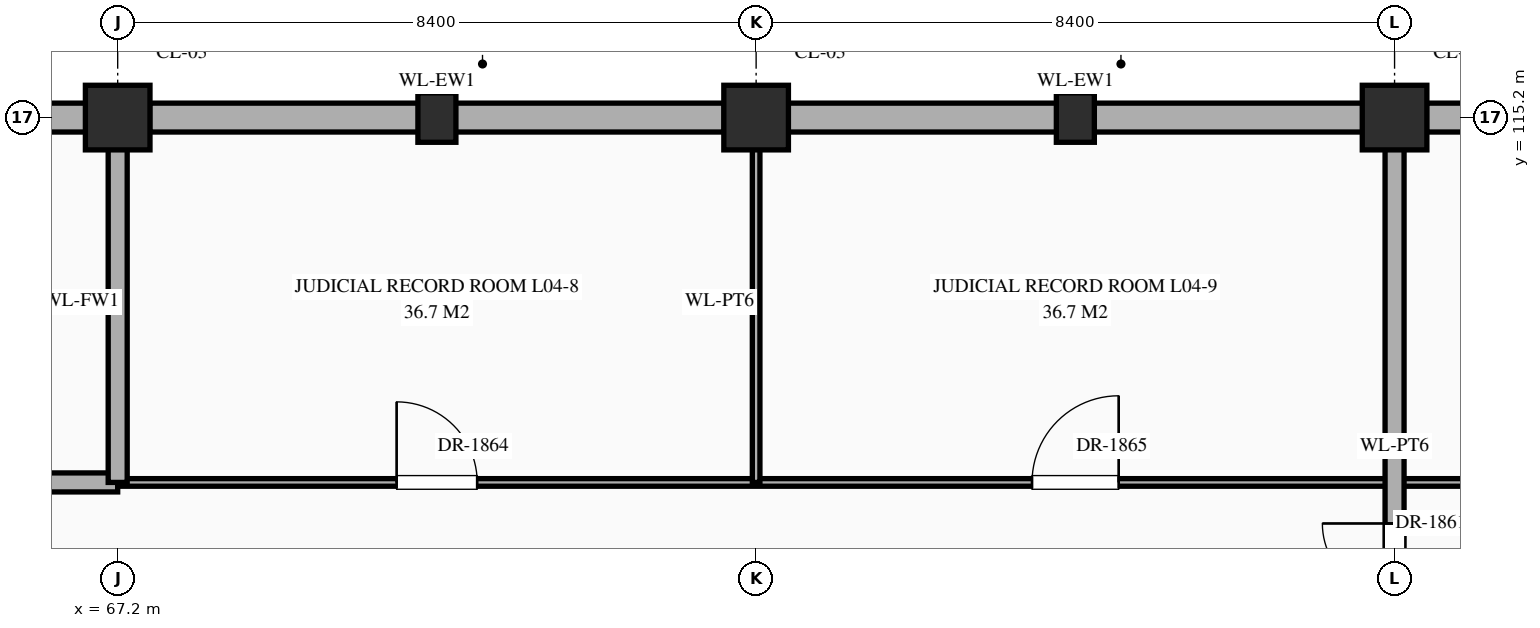
"""IFC4 building model, lengths in metres.
Left out: names, types, materials, properties, quantities, classifications, styles, units other than length and angle.
Written with IfcOpenShell. Run it as: python <this file> out.ifc"""

import sys

from ifc_helpers import new_model, si_unit, direction, frame, frame_2d, origin, origin_2d, place, context, subcontext, project, spatial, rectangle, extrude, element, fill, save


model = new_model("IFC4")
c1 = context("Model", 3, precision=1e-05, world=origin(), true_north=direction((0.0, 1.0)))
c2 = subcontext(c1, "Body", "Model", "MODEL_VIEW")
j1 = project(units=[si_unit("LENGTHUNIT", "METRE"), si_unit("PLANEANGLEUNIT", "RADIAN")], contexts=[c1])
p1 = place(None, origin())
s1 = spatial("IfcSite", under=j1, at=p1, CompositionType="ELEMENT")
p2 = place(p1, origin())
s2 = spatial("IfcBuilding", under=s1, at=p2, CompositionType="ELEMENT")
p3 = place(p2, frame((0.0, 0.0, 16.2)))
s3 = spatial("IfcBuildingStorey", under=s2, at=p3, CompositionType="ELEMENT", Elevation=16.2)
for number, where, z_axis, x_axis in (
    (1, (67.2, 115.2, 0.0), (0.0, 0.0, 1.0), (1.0, 0.0, 0.0)),
    (2, (75.6, 115.2, 0.0), (0.0, 0.0, 1.0), (1.0, 0.0, 0.0)),
    (3, (84.0, 115.2, 0.0), (0.0, 0.0, 1.0), (1.0, 0.0, 0.0)),
):
    element("IfcColumn", number, at=place(p3, frame(where, z_axis=z_axis, x_axis=x_axis)), inside=s3, PredefinedType="COLUMN", context=c2, shape_type="SweptSolid", body=[
        extrude(rectangle(XDim=0.85, YDim=0.85, at=origin_2d()), origin(), (0.0, 0.0, 1.0), 5.4),
    ])
for number, where, z_axis, x_axis in (
    (4, (71.4, 115.2, 0.0), (0.0, 0.0, 1.0), (1.0, 0.0, 0.0)),
    (5, (79.8, 115.2, 0.0), (0.0, 0.0, 1.0), (1.0, 0.0, 0.0)),
):
    element("IfcColumn", number, at=place(p3, frame(where, z_axis=z_axis, x_axis=x_axis)), inside=s3, PredefinedType="PILASTER", context=c2, shape_type="SweptSolid", body=[
        extrude(rectangle(XDim=0.5, YDim=0.65, at=origin_2d()), origin(), (0.0, 0.0, 1.0), 5.4),
    ])
p4 = place(p3, frame((59.22, 115.2, 0.0), z_axis=(0.0, 0.0, 1.0), x_axis=(1.0, 0.0, 0.0)))
e6 = element("IfcWall", 6, at=p4, inside=s3, PredefinedType="STANDARD", context=c2, shape_type="SweptSolid", body=[
    extrude(rectangle(XDim=7.56, YDim=0.38, at=frame_2d((3.78, 0.0))), origin(), (0.0, 0.0, 1.0), 4.47),
])
p5 = place(p3, frame((67.62, 115.2, 0.0), z_axis=(0.0, 0.0, 1.0), x_axis=(1.0, 0.0, 0.0)))
e7 = element("IfcWall", 7, at=p5, inside=s3, PredefinedType="STANDARD", context=c2, shape_type="SweptSolid", body=[
    extrude(rectangle(XDim=7.56, YDim=0.38, at=frame_2d((3.78, 0.0))), origin(), (0.0, 0.0, 1.0), 4.47),
])
for number, where, z_axis, x_axis in (
    (8, (76.02, 115.2, 0.0), (0.0, 0.0, 1.0), (1.0, 0.0, 0.0)),
    (9, (84.42, 115.2, 0.0), (0.0, 0.0, 1.0), (1.0, 0.0, 0.0)),
):
    element("IfcWall", number, at=place(p3, frame(where, z_axis=z_axis, x_axis=x_axis)), inside=s3, PredefinedType="STANDARD", context=c2, shape_type="SweptSolid", body=[
        extrude(rectangle(XDim=7.56, YDim=0.38, at=frame_2d((3.78, 0.0))), origin(), (0.0, 0.0, 1.0), 4.47),
    ])
p6 = place(p3, frame((58.8, 110.4, 0.0), z_axis=(0.0, 0.0, 1.0), x_axis=(1.0, 0.0, 0.0)))
e10 = element("IfcWall", 10, at=p6, inside=s3, PredefinedType="STANDARD", context=c2, shape_type="SweptSolid", body=[
    extrude(rectangle(XDim=8.4, YDim=0.25, at=frame_2d((4.2, 0.0))), origin(), (0.0, 0.0, 1.0), 5.12),
])
p7 = place(p6, frame((3.7, 0.0, 0.0)))
e11 = element("IfcOpeningElement", 11, at=p7, cuts=e10, PredefinedType="OPENING", context=c2, shape_type="SweptSolid", body=[
    extrude(rectangle(XDim=1.0, YDim=2.2, at=frame_2d((0.5, 1.1))), frame((0.0, 0.137, 0.0), z_axis=(0.0, -1.0, 0.0), x_axis=(1.0, 0.0, 0.0)), (0.0, 0.0, 1.0), 0.274),
])
p8 = place(p3, frame((67.2, 110.4, 0.0), z_axis=(0.0, 0.0, 1.0), x_axis=(1.0, 0.0, 0.0)))
e12 = element("IfcWall", 12, at=p8, inside=s3, PredefinedType="STANDARD", context=c2, shape_type="SweptSolid", body=[
    extrude(rectangle(XDim=33.6, YDim=0.1, at=frame_2d((16.8, 0.0))), origin(), (0.0, 0.0, 1.0), 5.12),
])
p9 = place(p8, frame((3.67, 0.0, 0.0)))
e13 = element("IfcOpeningElement", 13, at=p9, cuts=e12, PredefinedType="OPENING", context=c2, shape_type="SweptSolid", body=[
    extrude(rectangle(XDim=1.06, YDim=2.4, at=frame_2d((0.53, 1.2))), frame((0.0, 0.062, 0.0), z_axis=(0.0, -1.0, 0.0), x_axis=(1.0, 0.0, 0.0)), (0.0, 0.0, 1.0), 0.124),
])
p10 = place(p8, frame((12.03, 0.0, 0.0)))
e14 = element("IfcOpeningElement", 14, at=p10, cuts=e12, PredefinedType="OPENING", context=c2, shape_type="SweptSolid", body=[
    extrude(rectangle(XDim=1.14, YDim=2.4, at=frame_2d((0.57, 1.2))), frame((0.0, 0.062, 0.0), z_axis=(0.0, -1.0, 0.0), x_axis=(1.0, 0.0, 0.0)), (0.0, 0.0, 1.0), 0.124),
])
p11 = place(p8, frame((20.55, 0.0, 0.0)))
e15 = element("IfcOpeningElement", 15, at=p11, cuts=e12, PredefinedType="OPENING", context=c2, shape_type="SweptSolid", body=[
    extrude(rectangle(XDim=0.9, YDim=2.15, at=frame_2d((0.45, 1.075))), frame((0.0, 0.062, 0.0), z_axis=(0.0, -1.0, 0.0), x_axis=(1.0, 0.0, 0.0)), (0.0, 0.0, 1.0), 0.124),
])
p12 = place(p8, frame((28.97, 0.0, 0.0)))
e16 = element("IfcOpeningElement", 16, at=p12, cuts=e12, PredefinedType="OPENING", context=c2, shape_type="SweptSolid", body=[
    extrude(rectangle(XDim=0.86, YDim=2.1, at=frame_2d((0.43, 1.05))), frame((0.0, 0.062, 0.0), z_axis=(0.0, -1.0, 0.0), x_axis=(1.0, 0.0, 0.0)), (0.0, 0.0, 1.0), 0.124),
])
p13 = place(p3, frame((67.2, 110.4, 0.0), z_axis=(0.0, 0.0, 1.0), x_axis=(0.0, 1.0, 0.0)))
e17 = element("IfcWall", 17, at=p13, inside=s3, PredefinedType="STANDARD", context=c2, shape_type="SweptSolid", body=[
    extrude(rectangle(XDim=4.76, YDim=0.25, at=frame_2d((2.38, 0.0))), origin(), (0.0, 0.0, 1.0), 4.37),
])
p14 = place(p3, frame((75.6, 110.4, 0.0), z_axis=(0.0, 0.0, 1.0), x_axis=(0.0, 1.0, 0.0)))
e18 = element("IfcWall", 18, at=p14, inside=s3, PredefinedType="STANDARD", context=c2, shape_type="SweptSolid", body=[
    extrude(rectangle(XDim=4.76, YDim=0.1, at=frame_2d((2.38, 0.0))), origin(), (0.0, 0.0, 1.0), 4.37),
])
p15 = place(p3, frame((84.0, 79.2, 0.0), z_axis=(0.0, 0.0, 1.0), x_axis=(0.0, 1.0, 0.0)))
e19 = element("IfcWall", 19, at=p15, inside=s3, PredefinedType="STANDARD", context=c2, shape_type="SweptSolid", body=[
    extrude(rectangle(XDim=35.96, YDim=0.25, at=frame_2d((17.98, 0.0))), origin(), (0.0, 0.0, 1.0), 4.37),
])
p16 = place(p15, frame((22.585, 0.0, 0.0)))
e20 = element("IfcOpeningElement", 20, at=p16, cuts=e19, PredefinedType="OPENING", context=c2, shape_type="SweptSolid", body=[
    extrude(rectangle(XDim=2.0, YDim=2.4, at=frame_2d((1.0, 1.2))), frame((0.0, 0.137, 0.0), z_axis=(0.0, -1.0, 0.0), x_axis=(1.0, 0.0, 0.0)), (0.0, 0.0, 1.0), 0.274),
])
p17 = place(p15, frame((12.465, 0.0, 0.0)))
e21 = element("IfcOpeningElement", 21, at=p17, cuts=e19, PredefinedType="OPENING", context=c2, shape_type="SweptSolid", body=[
    extrude(rectangle(XDim=1.1, YDim=2.2, at=frame_2d((0.55, 1.1))), frame((0.0, 0.137, 0.0), z_axis=(0.0, -1.0, 0.0), x_axis=(1.0, 0.0, 0.0)), (0.0, 0.0, 1.0), 0.274),
])
p18 = place(p15, frame((15.31, 0.0, 0.0)))
e22 = element("IfcOpeningElement", 22, at=p18, cuts=e19, PredefinedType="OPENING", context=c2, shape_type="SweptSolid", body=[
    extrude(rectangle(XDim=0.95, YDim=2.15, at=frame_2d((0.475, 1.075))), frame((0.0, 0.137, 0.0), z_axis=(0.0, -1.0, 0.0), x_axis=(1.0, 0.0, 0.0)), (0.0, 0.0, 1.0), 0.274),
])
p19 = place(p15, frame((26.065, 0.0, 0.0)))
e23 = element("IfcOpeningElement", 23, at=p19, cuts=e19, PredefinedType="OPENING", context=c2, shape_type="SweptSolid", body=[
    extrude(rectangle(XDim=1.5, YDim=2.25, at=frame_2d((0.75, 1.125))), frame((0.0, 0.137, 0.0), z_axis=(0.0, -1.0, 0.0), x_axis=(1.0, 0.0, 0.0)), (0.0, 0.0, 1.0), 0.274),
])
p20 = place(p15, frame((29.71, 0.0, 0.0)))
e24 = element("IfcOpeningElement", 24, at=p20, cuts=e19, PredefinedType="OPENING", context=c2, shape_type="SweptSolid", body=[
    extrude(rectangle(XDim=0.95, YDim=2.15, at=frame_2d((0.475, 1.075))), frame((0.0, 0.137, 0.0), z_axis=(0.0, -1.0, 0.0), x_axis=(1.0, 0.0, 0.0)), (0.0, 0.0, 1.0), 0.274),
])
p21 = place(p15, frame((5.315, 0.0, 0.0)))
e25 = element("IfcOpeningElement", 25, at=p21, cuts=e19, PredefinedType="OPENING", context=c2, shape_type="SweptSolid", body=[
    extrude(rectangle(XDim=1.0, YDim=2.2, at=frame_2d((0.5, 1.1))), frame((0.0, 0.137, 0.0), z_axis=(0.0, -1.0, 0.0), x_axis=(1.0, 0.0, 0.0)), (0.0, 0.0, 1.0), 0.274),
])
p22 = place(p20, origin())
e26 = element("IfcDoor", 26, at=p22, inside=s3, OperationType="SINGLE_SWING_RIGHT", PredefinedType="DOOR", context=c2, shape_type="SweptSolid", body=[
    extrude(rectangle(XDim=0.95, YDim=2.15, at=frame_2d((0.475, 1.075))), frame((0.0, 0.025, 0.0), z_axis=(0.0, -1.0, 0.0), x_axis=(1.0, 0.0, 0.0)), (0.0, 0.0, 1.0), 0.05),
])
fill(e24, e26)
p23 = place(p9, origin())
e27 = element("IfcDoor", 27, at=p23, inside=s3, OperationType="SINGLE_SWING_LEFT", PredefinedType="DOOR", context=c2, shape_type="SweptSolid", body=[
    extrude(rectangle(XDim=1.06, YDim=2.4, at=frame_2d((0.53, 1.2))), frame((0.0, 0.025, 0.0), z_axis=(0.0, -1.0, 0.0), x_axis=(1.0, 0.0, 0.0)), (0.0, 0.0, 1.0), 0.05),
])
fill(e13, e27)
p24 = place(p10, origin())
e28 = element("IfcDoor", 28, at=p24, inside=s3, OperationType="SINGLE_SWING_RIGHT", PredefinedType="DOOR", context=c2, shape_type="SweptSolid", body=[
    extrude(rectangle(XDim=1.14, YDim=2.4, at=frame_2d((0.57, 1.2))), frame((0.0, 0.025, 0.0), z_axis=(0.0, -1.0, 0.0), x_axis=(1.0, 0.0, 0.0)), (0.0, 0.0, 1.0), 0.05),
])
fill(e14, e28)
save(model, sys.argv[1])
